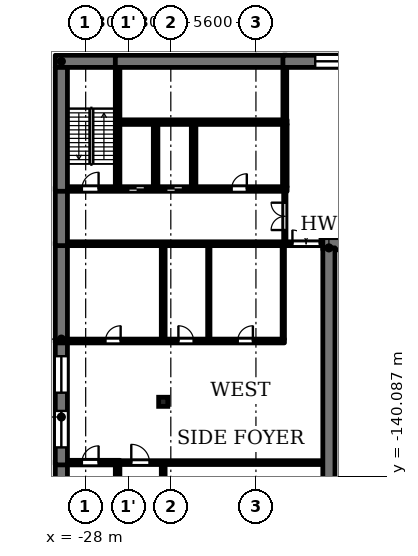
"""IFC4 building model, lengths in metres.
Left out: names, types, materials, properties, quantities, classifications, styles, units other than length and angle.
Written with IfcOpenShell. Run it as: python <this file> out.ifc"""

import sys

from ifc_helpers import new_model, si_unit, direction, frame, frame_2d, origin, origin_2d, place, context, subcontext, project, spatial, rectangle, extrude, element, fill, save


model = new_model("IFC4")
c1 = context("Model", 3, precision=1e-05, world=origin(), true_north=direction((0.0, 1.0)))
c2 = subcontext(c1, "Body", "Model", "MODEL_VIEW")
j1 = project(units=[si_unit("LENGTHUNIT", "METRE"), si_unit("PLANEANGLEUNIT", "RADIAN")], contexts=[c1])
p1 = place(None, origin())
s1 = spatial("IfcSite", under=j1, at=p1, CompositionType="ELEMENT")
p2 = place(p1, origin())
s2 = spatial("IfcBuilding", under=s1, at=p2, CompositionType="ELEMENT")
p3 = place(p2, frame((0.0, 0.0, 16.1)))
s3 = spatial("IfcBuildingStorey", under=s2, at=p3, CompositionType="ELEMENT", Elevation=16.1)
p4 = place(p3, frame((-22.9, -135.2, 0.0), z_axis=(0.0, 0.0, 1.0), x_axis=(1.0, 0.0, 0.0)))
e1 = element("IfcColumn", 1, at=p4, inside=s3, PredefinedType="COLUMN", context=c2, shape_type="SweptSolid", body=[
    extrude(rectangle(XDim=0.6, YDim=0.6, at=origin_2d()), origin(), (0.0, 0.0, 1.0), 4.45),
])
p5 = place(p3, frame((-29.2, -139.2, 0.0), z_axis=(0.0, 0.0, 1.0), x_axis=(1.0, 0.0, 0.0)))
e2 = element("IfcWall", 2, at=p5, inside=s3, PredefinedType="SOLIDWALL", context=c2, shape_type="SweptSolid", body=[
    extrude(rectangle(XDim=3.45, YDim=0.3, at=frame_2d((1.725, 0.0))), origin(), (0.0, 0.0, 1.0), 4.45),
])
p6 = place(p5, frame((0.95, 0.0, 0.0)))
e3 = element("IfcOpeningElement", 3, at=p6, cuts=e2, PredefinedType="OPENING", context=c2, shape_type="SweptSolid", body=[
    extrude(rectangle(XDim=1.1, YDim=2.1, at=frame_2d((0.55, 1.05))), frame((0.0, 0.16, 0.0), z_axis=(0.0, -1.0, 0.0), x_axis=(1.0, 0.0, 0.0)), (0.0, 0.0, 1.0), 0.32),
])
p7 = place(p3, frame((-25.75, -139.2, 0.0), z_axis=(0.0, 0.0, 1.0), x_axis=(1.0, 0.0, 0.0)))
e4 = element("IfcWall", 4, at=p7, inside=s3, PredefinedType="SOLIDWALL", context=c2, shape_type="SweptSolid", body=[
    extrude(rectangle(XDim=13.35, YDim=0.25, at=frame_2d((6.675, 0.0))), origin(), (0.0, 0.0, 1.0), 4.45),
])
p8 = place(p7, frame((0.75, 0.0, 0.0)))
e5 = element("IfcOpeningElement", 5, at=p8, cuts=e4, PredefinedType="OPENING", context=c2, shape_type="SweptSolid", body=[
    extrude(rectangle(XDim=1.2, YDim=2.1, at=frame_2d((0.6, 1.05))), frame((0.0, 0.135, 0.0), z_axis=(0.0, -1.0, 0.0), x_axis=(1.0, 0.0, 0.0)), (0.0, 0.0, 1.0), 0.27),
])
p9 = place(p3, frame((-29.2, -131.2, 0.0), z_axis=(0.0, 0.0, 1.0), x_axis=(1.0, 0.0, 0.0)))
e6 = element("IfcWall", 6, at=p9, inside=s3, PredefinedType="SOLIDWALL", context=c2, shape_type="SweptSolid", body=[
    extrude(rectangle(XDim=14.275, YDim=0.25, at=frame_2d((7.137, 0.0))), origin(), (0.0, 0.0, 1.0), 4.45),
])
p10 = place(p9, frame((2.5, 0.0, 0.0)))
e7 = element("IfcOpeningElement", 7, at=p10, cuts=e6, PredefinedType="OPENING", context=c2, shape_type="SweptSolid", body=[
    extrude(rectangle(XDim=1.0, YDim=2.1, at=frame_2d((0.5, 1.05))), frame((0.0, 0.135, 0.0), z_axis=(0.0, -1.0, 0.0), x_axis=(1.0, 0.0, 0.0)), (0.0, 0.0, 1.0), 0.27),
])
p11 = place(p9, frame((7.3, 0.0, 0.0)))
e8 = element("IfcOpeningElement", 8, at=p11, cuts=e6, PredefinedType="OPENING", context=c2, shape_type="SweptSolid", body=[
    extrude(rectangle(XDim=1.0, YDim=2.1, at=frame_2d((0.5, 1.05))), frame((0.0, 0.135, 0.0), z_axis=(0.0, -1.0, 0.0), x_axis=(1.0, 0.0, 0.0)), (0.0, 0.0, 1.0), 0.27),
])
p12 = place(p9, frame((11.2, 0.0, 0.0)))
e9 = element("IfcOpeningElement", 9, at=p12, cuts=e6, PredefinedType="OPENING", context=c2, shape_type="SweptSolid", body=[
    extrude(rectangle(XDim=1.0, YDim=2.1, at=frame_2d((0.5, 1.05))), frame((0.0, 0.135, 0.0), z_axis=(0.0, -1.0, 0.0), x_axis=(1.0, 0.0, 0.0)), (0.0, 0.0, 1.0), 0.27),
])
p13 = place(p3, frame((-29.2, -124.8, 0.0), z_axis=(0.0, 0.0, 1.0), x_axis=(1.0, 0.0, 0.0)))
e10 = element("IfcWall", 10, at=p13, inside=s3, PredefinedType="SOLIDWALL", context=c2, shape_type="SweptSolid", body=[
    extrude(rectangle(XDim=16.8, YDim=0.25, at=frame_2d((8.4, 0.0))), origin(), (0.0, 0.0, 1.0), 4.45),
])
p14 = place(p13, frame((14.8, 0.0, 0.0)))
e11 = element("IfcOpeningElement", 11, at=p14, cuts=e10, PredefinedType="OPENING", context=c2, shape_type="SweptSolid", body=[
    extrude(rectangle(XDim=1.8, YDim=2.1, at=frame_2d((0.9, 1.05))), frame((0.0, 0.135, 0.0), z_axis=(0.0, -1.0, 0.0), x_axis=(1.0, 0.0, 0.0)), (0.0, 0.0, 1.0), 0.27),
])
p15 = place(p3, frame((-12.4, -124.8, 0.0), z_axis=(0.0, 0.0, 1.0), x_axis=(1.0, 0.0, 0.0)))
e12 = element("IfcWall", 12, at=p15, inside=s3, PredefinedType="SOLIDWALL", context=c2, shape_type="SweptSolid", body=[
    extrude(rectangle(XDim=24.8, YDim=0.8, at=frame_2d((12.4, 0.0))), origin(), (0.0, 0.0, 1.0), 4.8),
])
p16 = place(p3, frame((-29.2, -121.2, 0.0), z_axis=(0.0, 0.0, 1.0), x_axis=(1.0, 0.0, 0.0)))
e13 = element("IfcWall", 13, at=p16, inside=s3, PredefinedType="SOLIDWALL", context=c2, shape_type="SweptSolid", body=[
    extrude(rectangle(XDim=14.45, YDim=0.3, at=frame_2d((7.225, 0.0))), origin(), (0.0, 0.0, 1.0), 4.45),
])
p17 = place(p16, frame((4.0, 0.0, 0.0)))
e14 = element("IfcOpeningElement", 14, at=p17, cuts=e13, PredefinedType="OPENING", context=c2, shape_type="SweptSolid", body=[
    extrude(rectangle(XDim=1.1, YDim=2.1, at=frame_2d((0.55, 1.05))), frame((0.0, 0.16, 0.0), z_axis=(0.0, -1.0, 0.0), x_axis=(1.0, 0.0, 0.0)), (0.0, 0.0, 1.0), 0.32),
])
p18 = place(p16, frame((6.5, 0.0, 0.0)))
e15 = element("IfcOpeningElement", 15, at=p18, cuts=e13, PredefinedType="OPENING", context=c2, shape_type="SweptSolid", body=[
    extrude(rectangle(XDim=1.1, YDim=2.1, at=frame_2d((0.55, 1.05))), frame((0.0, 0.16, 0.0), z_axis=(0.0, -1.0, 0.0), x_axis=(1.0, 0.0, 0.0)), (0.0, 0.0, 1.0), 0.32),
])
p19 = place(p16, frame((0.95, 0.0, 0.0)))
e16 = element("IfcOpeningElement", 16, at=p19, cuts=e13, PredefinedType="OPENING", context=c2, shape_type="SweptSolid", body=[
    extrude(rectangle(XDim=1.1, YDim=2.1, at=frame_2d((0.55, 1.05))), frame((0.0, 0.16, 0.0), z_axis=(0.0, -1.0, 0.0), x_axis=(1.0, 0.0, 0.0)), (0.0, 0.0, 1.0), 0.32),
])
p20 = place(p16, frame((10.8, 0.0, 0.0)))
e17 = element("IfcOpeningElement", 17, at=p20, cuts=e13, PredefinedType="OPENING", context=c2, shape_type="SweptSolid", body=[
    extrude(rectangle(XDim=1.0, YDim=2.1, at=frame_2d((0.5, 1.05))), frame((0.0, 0.16, 0.0), z_axis=(0.0, -1.0, 0.0), x_axis=(1.0, 0.0, 0.0)), (0.0, 0.0, 1.0), 0.32),
])
p21 = place(p3, frame((-25.75, -116.8, 0.0), z_axis=(0.0, 0.0, 1.0), x_axis=(1.0, 0.0, 0.0)))
e18 = element("IfcWall", 18, at=p21, inside=s3, PredefinedType="SOLIDWALL", context=c2, shape_type="SweptSolid", body=[
    extrude(rectangle(XDim=11.0, YDim=0.3, at=frame_2d((5.5, 0.0))), origin(), (0.0, 0.0, 1.0), 4.45),
])
p22 = place(p3, frame((-30.0, -112.8, 0.0), z_axis=(0.0, 0.0, 1.0), x_axis=(1.0, 0.0, 0.0)))
e19 = element("IfcWall", 19, at=p22, inside=s3, PredefinedType="SOLIDWALL", context=c2, shape_type="SweptSolid", body=[
    extrude(rectangle(XDim=4.25, YDim=0.8, at=frame_2d((2.125, 0.0))), origin(), (0.0, 0.0, 1.0), 4.45),
])
p23 = place(p3, frame((-26.05, -112.8, 0.0), z_axis=(0.0, 0.0, 1.0), x_axis=(1.0, 0.0, 0.0)))
e20 = element("IfcWall", 20, at=p23, inside=s3, PredefinedType="SOLIDWALL", context=c2, shape_type="SweptSolid", body=[
    extrude(rectangle(XDim=11.275, YDim=0.8, at=frame_2d((5.637, 0.0))), origin(), (0.0, 0.0, 1.0), 4.45),
])
p24 = place(p3, frame((-15.025, -112.8, 0.0), z_axis=(0.0, 0.0, 1.0), x_axis=(1.0, 0.0, 0.0)))
e21 = element("IfcWall", 21, at=p24, inside=s3, PredefinedType="SOLIDWALL", context=c2, shape_type="SweptSolid", body=[
    extrude(rectangle(XDim=30.05, YDim=0.8, at=frame_2d((15.025, 0.0))), origin(), (0.0, 0.0, 1.0), 4.45),
])
p25 = place(p24, frame((2.125, 0.0, 0.9)))
e22 = element("IfcOpeningElement", 22, at=p25, cuts=e21, PredefinedType="OPENING", context=c2, shape_type="SweptSolid", body=[
    extrude(rectangle(XDim=1.8, YDim=1.5, at=frame_2d((0.9, 0.75))), frame((0.0, 0.41, 0.0), z_axis=(0.0, -1.0, 0.0), x_axis=(1.0, 0.0, 0.0)), (0.0, 0.0, 1.0), 0.82),
])
p26 = place(p24, frame((5.125, 0.0, 0.9)))
e23 = element("IfcOpeningElement", 23, at=p26, cuts=e21, PredefinedType="OPENING", context=c2, shape_type="SweptSolid", body=[
    extrude(rectangle(XDim=1.8, YDim=1.5, at=frame_2d((0.9, 0.75))), frame((0.0, 0.41, 0.0), z_axis=(0.0, -1.0, 0.0), x_axis=(1.0, 0.0, 0.0)), (0.0, 0.0, 1.0), 0.82),
])
p27 = place(p24, frame((8.125, 0.0, 0.9)))
e24 = element("IfcOpeningElement", 24, at=p27, cuts=e21, PredefinedType="OPENING", context=c2, shape_type="SweptSolid", body=[
    extrude(rectangle(XDim=1.8, YDim=1.5, at=frame_2d((0.9, 0.75))), frame((0.0, 0.41, 0.0), z_axis=(0.0, -1.0, 0.0), x_axis=(1.0, 0.0, 0.0)), (0.0, 0.0, 1.0), 0.82),
])
p28 = place(p24, frame((11.125, 0.0, 0.9)))
e25 = element("IfcOpeningElement", 25, at=p28, cuts=e21, PredefinedType="OPENING", context=c2, shape_type="SweptSolid", body=[
    extrude(rectangle(XDim=1.8, YDim=1.5, at=frame_2d((0.9, 0.75))), frame((0.0, 0.41, 0.0), z_axis=(0.0, -1.0, 0.0), x_axis=(1.0, 0.0, 0.0)), (0.0, 0.0, 1.0), 0.82),
])
p29 = place(p24, frame((14.125, 0.0, 0.9)))
e26 = element("IfcOpeningElement", 26, at=p29, cuts=e21, PredefinedType="OPENING", context=c2, shape_type="SweptSolid", body=[
    extrude(rectangle(XDim=1.8, YDim=1.5, at=frame_2d((0.9, 0.75))), frame((0.0, 0.41, 0.0), z_axis=(0.0, -1.0, 0.0), x_axis=(1.0, 0.0, 0.0)), (0.0, 0.0, 1.0), 0.82),
])
p30 = place(p24, frame((17.125, 0.0, 0.9)))
e27 = element("IfcOpeningElement", 27, at=p30, cuts=e21, PredefinedType="OPENING", context=c2, shape_type="SweptSolid", body=[
    extrude(rectangle(XDim=1.8, YDim=1.5, at=frame_2d((0.9, 0.75))), frame((0.0, 0.41, 0.0), z_axis=(0.0, -1.0, 0.0), x_axis=(1.0, 0.0, 0.0)), (0.0, 0.0, 1.0), 0.82),
])
p31 = place(p24, frame((20.125, 0.0, 0.9)))
e28 = element("IfcOpeningElement", 28, at=p31, cuts=e21, PredefinedType="OPENING", context=c2, shape_type="SweptSolid", body=[
    extrude(rectangle(XDim=1.8, YDim=1.5, at=frame_2d((0.9, 0.75))), frame((0.0, 0.41, 0.0), z_axis=(0.0, -1.0, 0.0), x_axis=(1.0, 0.0, 0.0)), (0.0, 0.0, 1.0), 0.82),
])
p32 = place(p24, frame((23.125, 0.0, 0.9)))
e29 = element("IfcOpeningElement", 29, at=p32, cuts=e21, PredefinedType="OPENING", context=c2, shape_type="SweptSolid", body=[
    extrude(rectangle(XDim=1.8, YDim=1.5, at=frame_2d((0.9, 0.75))), frame((0.0, 0.41, 0.0), z_axis=(0.0, -1.0, 0.0), x_axis=(1.0, 0.0, 0.0)), (0.0, 0.0, 1.0), 0.82),
])
p33 = place(p24, frame((26.125, 0.0, 0.9)))
e30 = element("IfcOpeningElement", 30, at=p33, cuts=e21, PredefinedType="OPENING", context=c2, shape_type="SweptSolid", body=[
    extrude(rectangle(XDim=1.8, YDim=1.5, at=frame_2d((0.9, 0.75))), frame((0.0, 0.41, 0.0), z_axis=(0.0, -1.0, 0.0), x_axis=(1.0, 0.0, 0.0)), (0.0, 0.0, 1.0), 0.82),
])
p34 = place(p3, frame((-29.6, -147.75, 0.0), z_axis=(0.0, 0.0, 1.0), x_axis=(0.0, 1.0, 0.0)))
e31 = element("IfcWall", 31, at=p34, inside=s3, PredefinedType="SOLIDWALL", context=c2, shape_type="SweptSolid", body=[
    extrude(rectangle(XDim=8.7, YDim=0.8, at=frame_2d((4.35, 0.0))), origin(), (0.0, 0.0, 1.0), 4.45),
])
p35 = place(p3, frame((-29.6, -139.35, 0.0), z_axis=(0.0, 0.0, 1.0), x_axis=(0.0, 1.0, 0.0)))
e32 = element("IfcWall", 32, at=p35, inside=s3, PredefinedType="SOLIDWALL", context=c2, shape_type="SweptSolid", body=[
    extrude(rectangle(XDim=8.275, YDim=0.8, at=frame_2d((4.137, 0.0))), origin(), (0.0, 0.0, 1.0), 4.45),
])
p36 = place(p35, frame((1.15, 0.0, 0.6)))
e33 = element("IfcOpeningElement", 33, at=p36, cuts=e32, PredefinedType="OPENING", context=c2, shape_type="SweptSolid", body=[
    extrude(rectangle(XDim=2.4, YDim=3.2, at=frame_2d((1.2, 1.6))), frame((0.0, 0.41, 0.0), z_axis=(0.0, -1.0, 0.0), x_axis=(1.0, 0.0, 0.0)), (0.0, 0.0, 1.0), 0.82),
])
p37 = place(p35, frame((4.75, 0.0, 0.6)))
e34 = element("IfcOpeningElement", 34, at=p37, cuts=e32, PredefinedType="OPENING", context=c2, shape_type="SweptSolid", body=[
    extrude(rectangle(XDim=2.4, YDim=3.2, at=frame_2d((1.2, 1.6))), frame((0.0, 0.41, 0.0), z_axis=(0.0, -1.0, 0.0), x_axis=(1.0, 0.0, 0.0)), (0.0, 0.0, 1.0), 0.82),
])
p38 = place(p3, frame((-29.6, -131.325, 0.0), z_axis=(0.0, 0.0, 1.0), x_axis=(0.0, 1.0, 0.0)))
e35 = element("IfcWall", 35, at=p38, inside=s3, PredefinedType="SOLIDWALL", context=c2, shape_type="SweptSolid", body=[
    extrude(rectangle(XDim=6.65, YDim=0.8, at=frame_2d((3.325, 0.0))), origin(), (0.0, 0.0, 1.0), 4.45),
])
p39 = place(p3, frame((-29.6, -124.925, 0.0), z_axis=(0.0, 0.0, 1.0), x_axis=(0.0, 1.0, 0.0)))
e36 = element("IfcWall", 36, at=p39, inside=s3, PredefinedType="SOLIDWALL", context=c2, shape_type="SweptSolid", body=[
    extrude(rectangle(XDim=3.875, YDim=0.8, at=frame_2d((1.938, 0.0))), origin(), (0.0, 0.0, 1.0), 4.45),
])
p40 = place(p3, frame((-29.6, -121.35, 0.0), z_axis=(0.0, 0.0, 1.0), x_axis=(0.0, 1.0, 0.0)))
e37 = element("IfcWall", 37, at=p40, inside=s3, PredefinedType="SOLIDWALL", context=c2, shape_type="SweptSolid", body=[
    extrude(rectangle(XDim=8.15, YDim=0.8, at=frame_2d((4.075, 0.0))), origin(), (0.0, 0.0, 1.0), 4.45),
])
p41 = place(p3, frame((-25.9, -147.45, 0.0), z_axis=(0.0, 0.0, 1.0), x_axis=(0.0, 1.0, 0.0)))
e38 = element("IfcWall", 38, at=p41, inside=s3, PredefinedType="SOLIDWALL", context=c2, shape_type="SweptSolid", body=[
    extrude(rectangle(XDim=8.225, YDim=0.3, at=frame_2d((4.112, 0.0))), origin(), (0.0, 0.0, 1.0), 4.45),
])
p42 = place(p3, frame((-25.9, -121.05, 0.0), z_axis=(0.0, 0.0, 1.0), x_axis=(0.0, 1.0, 0.0)))
e39 = element("IfcWall", 39, at=p42, inside=s3, PredefinedType="SOLIDWALL", context=c2, shape_type="SweptSolid", body=[
    extrude(rectangle(XDim=7.85, YDim=0.3, at=frame_2d((3.925, 0.0))), origin(), (0.0, 0.0, 1.0), 4.45),
])
p43 = place(p3, frame((-23.4, -121.05, 0.0), z_axis=(0.0, 0.0, 1.0), x_axis=(0.0, 1.0, 0.0)))
e40 = element("IfcWall", 40, at=p43, inside=s3, PredefinedType="SOLIDWALL", context=c2, shape_type="SweptSolid", body=[
    extrude(rectangle(XDim=4.1, YDim=0.3, at=frame_2d((2.05, 0.0))), origin(), (0.0, 0.0, 1.0), 4.45),
])
p44 = place(p3, frame((-22.9, -159.2, 0.0), z_axis=(0.0, 0.0, 1.0), x_axis=(0.0, 1.0, 0.0)))
e41 = element("IfcWall", 41, at=p44, inside=s3, PredefinedType="SOLIDWALL", context=c2, shape_type="SweptSolid", body=[
    extrude(rectangle(XDim=19.875, YDim=0.25, at=frame_2d((9.938, 0.0))), origin(), (0.0, 0.0, 1.0), 4.45),
])
p45 = place(p44, frame((8.9, 0.0, 0.0)))
e42 = element("IfcOpeningElement", 42, at=p45, cuts=e41, PredefinedType="OPENING", context=c2, shape_type="SweptSolid", body=[
    extrude(rectangle(XDim=1.8, YDim=2.1, at=frame_2d((0.9, 1.05))), frame((0.0, 0.135, 0.0), z_axis=(0.0, -1.0, 0.0), x_axis=(1.0, 0.0, 0.0)), (0.0, 0.0, 1.0), 0.27),
])
p46 = place(p3, frame((-22.9, -131.075, 0.0), z_axis=(0.0, 0.0, 1.0), x_axis=(0.0, 1.0, 0.0)))
e43 = element("IfcWall", 43, at=p46, inside=s3, PredefinedType="SOLIDWALL", context=c2, shape_type="SweptSolid", body=[
    extrude(rectangle(XDim=6.15, YDim=0.25, at=frame_2d((3.075, 0.0))), origin(), (0.0, 0.0, 1.0), 4.45),
])
p47 = place(p3, frame((-20.9, -121.05, 0.0), z_axis=(0.0, 0.0, 1.0), x_axis=(0.0, 1.0, 0.0)))
e44 = element("IfcWall", 44, at=p47, inside=s3, PredefinedType="SOLIDWALL", context=c2, shape_type="SweptSolid", body=[
    extrude(rectangle(XDim=4.1, YDim=0.3, at=frame_2d((2.05, 0.0))), origin(), (0.0, 0.0, 1.0), 4.45),
])
for number, where, z_axis, x_axis in (
    (45, (-19.9, -131.075, 0.0), (0.0, 0.0, 1.0), (0.0, 1.0, 0.0)),
    (46, (-15.0, -131.075, 0.0), (0.0, 0.0, 1.0), (0.0, 1.0, 0.0)),
):
    element("IfcWall", number, at=place(p3, frame(where, z_axis=z_axis, x_axis=x_axis)), inside=s3, PredefinedType="PARTITIONING", context=c2, shape_type="SweptSolid", body=[
        extrude(rectangle(XDim=6.15, YDim=0.15, at=frame_2d((3.075, 0.0))), origin(), (0.0, 0.0, 1.0), 4.45),
    ])
p48 = place(p3, frame((-14.9, -124.675, 0.0), z_axis=(0.0, 0.0, 1.0), x_axis=(0.0, 1.0, 0.0)))
e47 = element("IfcWall", 47, at=p48, inside=s3, PredefinedType="PARTITIONING", context=c2, shape_type="SweptSolid", body=[
    extrude(rectangle(XDim=3.325, YDim=0.15, at=frame_2d((1.663, 0.0))), origin(), (0.0, 0.0, 1.0), 4.45),
])
p49 = place(p48, frame((0.775, 0.0, 0.0)))
e48 = element("IfcOpeningElement", 48, at=p49, cuts=e47, PredefinedType="OPENING", context=c2, shape_type="SweptSolid", body=[
    extrude(rectangle(XDim=1.8, YDim=2.1, at=frame_2d((0.9, 1.05))), frame((0.0, 0.085, 0.0), z_axis=(0.0, -1.0, 0.0), x_axis=(1.0, 0.0, 0.0)), (0.0, 0.0, 1.0), 0.17),
])
p50 = place(p3, frame((-14.9, -121.05, 0.0), z_axis=(0.0, 0.0, 1.0), x_axis=(0.0, 1.0, 0.0)))
e49 = element("IfcWall", 49, at=p50, inside=s3, PredefinedType="SOLIDWALL", context=c2, shape_type="SweptSolid", body=[
    extrude(rectangle(XDim=4.1, YDim=0.3, at=frame_2d((2.05, 0.0))), origin(), (0.0, 0.0, 1.0), 4.45),
])
p51 = place(p3, frame((-14.9, -116.65, 0.0), z_axis=(0.0, 0.0, 1.0), x_axis=(0.0, 1.0, 0.0)))
e50 = element("IfcWall", 50, at=p51, inside=s3, PredefinedType="SOLIDWALL", context=c2, shape_type="SweptSolid", body=[
    extrude(rectangle(XDim=3.45, YDim=0.25, at=frame_2d((1.725, 0.0))), origin(), (0.0, 0.0, 1.0), 4.45),
])
p52 = place(p3, frame((-12.0, -159.2, 0.0), z_axis=(0.0, 0.0, 1.0), x_axis=(0.0, 1.0, 0.0)))
e51 = element("IfcWall", 51, at=p52, inside=s3, PredefinedType="SOLIDWALL", context=c2, shape_type="SweptSolid", body=[
    extrude(rectangle(XDim=34.125, YDim=0.8, at=frame_2d((17.062, 0.0))), origin(), (0.0, 0.0, 1.0), 4.8),
])
p53 = place(p25, origin())
e52 = element("IfcWindow", 52, at=p53, inside=s3, PartitioningType="SINGLE_PANEL", PredefinedType="WINDOW", context=c2, shape_type="SweptSolid", body=[
    extrude(rectangle(XDim=1.8, YDim=1.5, at=frame_2d((0.9, 0.75))), frame((0.0, 0.03, 0.0), z_axis=(0.0, -1.0, 0.0), x_axis=(1.0, 0.0, 0.0)), (0.0, 0.0, 1.0), 0.06),
])
fill(e22, e52)
p54 = place(p36, origin())
e53 = element("IfcWindow", 53, at=p54, inside=s3, PartitioningType="SINGLE_PANEL", PredefinedType="WINDOW", context=c2, shape_type="SweptSolid", body=[
    extrude(rectangle(XDim=2.4, YDim=3.2, at=frame_2d((1.2, 1.6))), frame((0.0, 0.03, 0.0), z_axis=(0.0, -1.0, 0.0), x_axis=(1.0, 0.0, 0.0)), (0.0, 0.0, 1.0), 0.06),
])
fill(e33, e53)
p55 = place(p37, origin())
e54 = element("IfcWindow", 54, at=p55, inside=s3, PartitioningType="SINGLE_PANEL", PredefinedType="WINDOW", context=c2, shape_type="SweptSolid", body=[
    extrude(rectangle(XDim=2.4, YDim=3.2, at=frame_2d((1.2, 1.6))), frame((0.0, 0.03, 0.0), z_axis=(0.0, -1.0, 0.0), x_axis=(1.0, 0.0, 0.0)), (0.0, 0.0, 1.0), 0.06),
])
fill(e34, e54)
p56 = place(p17, origin())
e55 = element("IfcDoor", 55, at=p56, inside=s3, OperationType="DOUBLE_DOOR_SLIDING", PredefinedType="DOOR", context=c2, shape_type="SweptSolid", body=[
    extrude(rectangle(XDim=1.1, YDim=2.1, at=frame_2d((0.55, 1.05))), frame((0.0, 0.025, 0.0), z_axis=(0.0, -1.0, 0.0), x_axis=(1.0, 0.0, 0.0)), (0.0, 0.0, 1.0), 0.05),
])
fill(e14, e55)
p57 = place(p18, origin())
e56 = element("IfcDoor", 56, at=p57, inside=s3, OperationType="DOUBLE_DOOR_SLIDING", PredefinedType="DOOR", context=c2, shape_type="SweptSolid", body=[
    extrude(rectangle(XDim=1.1, YDim=2.1, at=frame_2d((0.55, 1.05))), frame((0.0, 0.025, 0.0), z_axis=(0.0, -1.0, 0.0), x_axis=(1.0, 0.0, 0.0)), (0.0, 0.0, 1.0), 0.05),
])
fill(e15, e56)
p58 = place(p19, origin())
e57 = element("IfcDoor", 57, at=p58, inside=s3, OperationType="SINGLE_SWING_RIGHT", PredefinedType="DOOR", context=c2, shape_type="SweptSolid", body=[
    extrude(rectangle(XDim=1.1, YDim=2.1, at=frame_2d((0.55, 1.05))), frame((0.0, 0.025, 0.0), z_axis=(0.0, -1.0, 0.0), x_axis=(1.0, 0.0, 0.0)), (0.0, 0.0, 1.0), 0.05),
])
fill(e16, e57)
p59 = place(p6, origin())
e58 = element("IfcDoor", 58, at=p59, inside=s3, OperationType="SINGLE_SWING_RIGHT", PredefinedType="DOOR", context=c2, shape_type="SweptSolid", body=[
    extrude(rectangle(XDim=1.1, YDim=2.1, at=frame_2d((0.55, 1.05))), frame((0.0, 0.025, 0.0), z_axis=(0.0, -1.0, 0.0), x_axis=(1.0, 0.0, 0.0)), (0.0, 0.0, 1.0), 0.05),
])
fill(e3, e58)
p60 = place(p20, origin())
e59 = element("IfcDoor", 59, at=p60, inside=s3, OperationType="SINGLE_SWING_RIGHT", PredefinedType="DOOR", context=c2, shape_type="SweptSolid", body=[
    extrude(rectangle(XDim=1.0, YDim=2.1, at=frame_2d((0.5, 1.05))), frame((0.0, 0.025, 0.0), z_axis=(0.0, -1.0, 0.0), x_axis=(1.0, 0.0, 0.0)), (0.0, 0.0, 1.0), 0.05),
])
fill(e17, e59)
p61 = place(p49, origin())
e60 = element("IfcDoor", 60, at=p61, inside=s3, OperationType="DOUBLE_DOOR_SINGLE_SWING", PredefinedType="DOOR", context=c2, shape_type="SweptSolid", body=[
    extrude(rectangle(XDim=1.8, YDim=2.1, at=frame_2d((0.9, 1.05))), frame((0.0, 0.025, 0.0), z_axis=(0.0, -1.0, 0.0), x_axis=(1.0, 0.0, 0.0)), (0.0, 0.0, 1.0), 0.05),
])
fill(e48, e60)
p62 = place(p14, origin())
e61 = element("IfcDoor", 61, at=p62, inside=s3, OperationType="DOUBLE_DOOR_SINGLE_SWING", PredefinedType="DOOR", context=c2, shape_type="SweptSolid", body=[
    extrude(rectangle(XDim=1.8, YDim=2.1, at=frame_2d((0.9, 1.05))), frame((0.0, 0.025, 0.0), z_axis=(0.0, -1.0, 0.0), x_axis=(1.0, 0.0, 0.0)), (0.0, 0.0, 1.0), 0.05),
])
fill(e11, e61)
p63 = place(p10, origin())
e62 = element("IfcDoor", 62, at=p63, inside=s3, OperationType="SINGLE_SWING_RIGHT", PredefinedType="DOOR", context=c2, shape_type="SweptSolid", body=[
    extrude(rectangle(XDim=1.0, YDim=2.1, at=frame_2d((0.5, 1.05))), frame((0.0, 0.025, 0.0), z_axis=(0.0, -1.0, 0.0), x_axis=(1.0, 0.0, 0.0)), (0.0, 0.0, 1.0), 0.05),
])
fill(e7, e62)
p64 = place(p11, origin())
e63 = element("IfcDoor", 63, at=p64, inside=s3, OperationType="SINGLE_SWING_LEFT", PredefinedType="DOOR", context=c2, shape_type="SweptSolid", body=[
    extrude(rectangle(XDim=1.0, YDim=2.1, at=frame_2d((0.5, 1.05))), frame((0.0, 0.025, 0.0), z_axis=(0.0, -1.0, 0.0), x_axis=(1.0, 0.0, 0.0)), (0.0, 0.0, 1.0), 0.05),
])
fill(e8, e63)
p65 = place(p12, origin())
e64 = element("IfcDoor", 64, at=p65, inside=s3, OperationType="SINGLE_SWING_RIGHT", PredefinedType="DOOR", context=c2, shape_type="SweptSolid", body=[
    extrude(rectangle(XDim=1.0, YDim=2.1, at=frame_2d((0.5, 1.05))), frame((0.0, 0.025, 0.0), z_axis=(0.0, -1.0, 0.0), x_axis=(1.0, 0.0, 0.0)), (0.0, 0.0, 1.0), 0.05),
])
fill(e9, e64)
p66 = place(p8, origin())
e65 = element("IfcDoor", 65, at=p66, inside=s3, OperationType="SINGLE_SWING_LEFT", PredefinedType="DOOR", context=c2, shape_type="SweptSolid", body=[
    extrude(rectangle(XDim=1.2, YDim=2.1, at=frame_2d((0.6, 1.05))), frame((0.0, 0.025, 0.0), z_axis=(0.0, -1.0, 0.0), x_axis=(1.0, 0.0, 0.0)), (0.0, 0.0, 1.0), 0.05),
])
fill(e5, e65)
save(model, sys.argv[1])
